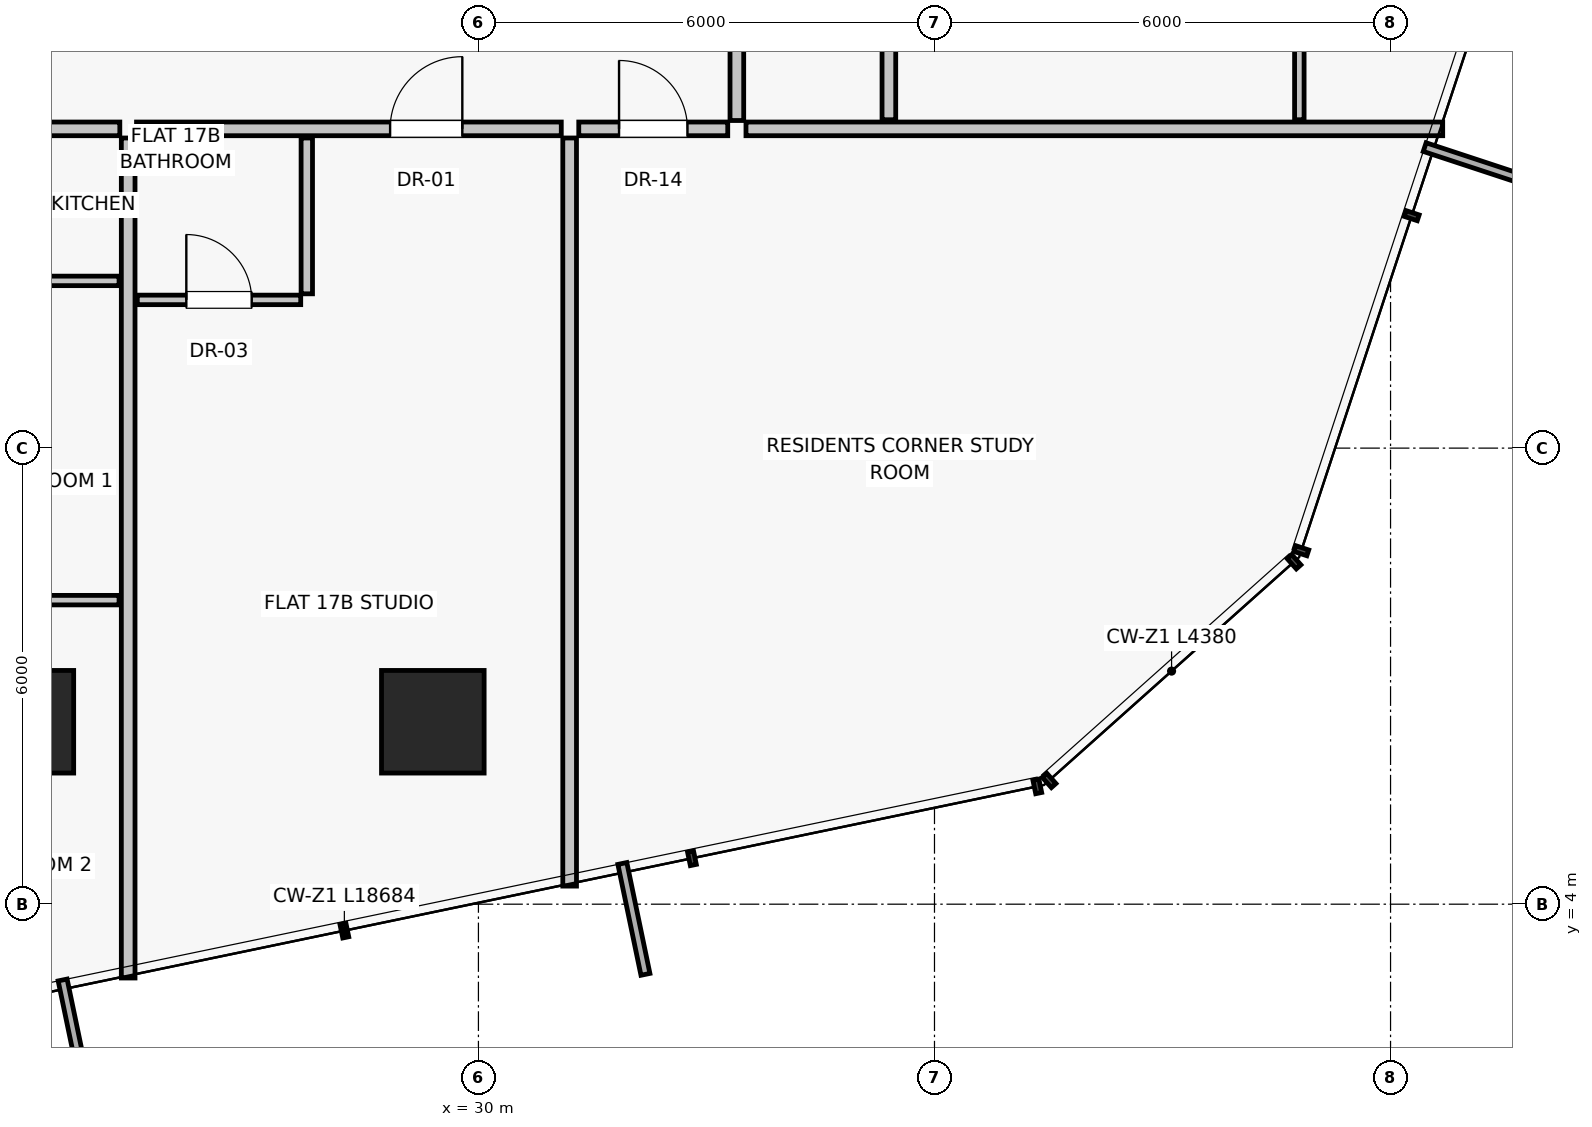
"""IFC4 building model, lengths in metres.
Left out: names, types, materials, properties, quantities, classifications, styles, units other than length and angle.
Written with IfcOpenShell. Run it as: python <this file> out.ifc"""

import sys

from ifc_helpers import new_model, si_unit, direction, frame, frame_2d, origin, origin_2d, place, context, subcontext, project, spatial, rectangle, extrude, source, transform, mapped, element, fill, save


model = new_model("IFC4")
c1 = context("Model", 3, precision=1e-05, world=origin(), true_north=direction((0.0, 1.0)))
c2 = subcontext(c1, "Body", "Model", "MODEL_VIEW")
j1 = project(units=[si_unit("LENGTHUNIT", "METRE"), si_unit("PLANEANGLEUNIT", "RADIAN")], contexts=[c1])
p1 = place(None, origin())
s1 = spatial("IfcSite", under=j1, at=p1, CompositionType="ELEMENT")
p2 = place(p1, origin())
s2 = spatial("IfcBuilding", under=s1, at=p2, CompositionType="ELEMENT")
p3 = place(p2, frame((0.0, 0.0, 64.1)))
s3 = spatial("IfcBuildingStorey", under=s2, at=p3, CompositionType="ELEMENT", Elevation=64.1)
for number, where, z_axis, x_axis in (
    (1, (24.0, 6.4, 0.0), (0.0, 0.0, 1.0), (1.0, 0.0, 0.0)),
    (2, (29.4, 6.4, 0.0), (0.0, 0.0, 1.0), (1.0, 0.0, 0.0)),
):
    element("IfcColumn", number, at=place(p3, frame(where, z_axis=z_axis, x_axis=x_axis)), inside=s3, PredefinedType="COLUMN", context=c2, shape_type="SweptSolid", body=[
        extrude(rectangle(XDim=1.35, YDim=1.35, at=origin_2d()), origin(), (0.0, 0.0, 1.0), 3.25),
    ])
p4 = place(p3, frame((31.2, 14.08, 0.0), z_axis=(0.0, 0.0, 1.0), x_axis=(0.0, -1.0, 0.0)))
e3 = element("IfcWall", 3, at=p4, inside=s3, PredefinedType="PARTITIONING", context=c2, shape_type="SweptSolid", body=[
    extrude(rectangle(XDim=9.842, YDim=0.18, at=frame_2d((4.921, 0.0))), origin(), (0.0, 0.0, 1.0), 3.0),
])
p5 = place(p3, frame((16.91, 14.2, 0.0), z_axis=(0.0, 0.0, 1.0), x_axis=(1.0, 0.0, 0.0)))
e4 = element("IfcWall", 4, at=p5, inside=s3, PredefinedType="PARTITIONING", context=c2, shape_type="SweptSolid", body=[
    extrude(rectangle(XDim=8.372, YDim=0.18, at=frame_2d((4.186, 0.0))), origin(), (0.0, 0.0, 1.0), 3.0),
])
p6 = place(p5, frame((2.903, 0.0, 0.0)))
e5 = element("IfcOpeningElement", 5, at=p6, cuts=e4, PredefinedType="OPENING", context=c2, shape_type="SweptSolid", body=[
    extrude(rectangle(XDim=0.95, YDim=2.02, at=frame_2d((0.475, 1.01))), frame((0.0, 0.1, 0.0), z_axis=(0.0, -1.0, 0.0), x_axis=(1.0, 0.0, 0.0)), (0.0, 0.0, 1.0), 0.2),
])
for number, where, z_axis, x_axis in (
    (6, (21.626, 12.2, 0.0), (0.0, 0.0, 1.0), (1.0, 0.0, 0.0)),
    (7, (21.626, 8.0, 0.0), (0.0, 0.0, 1.0), (1.0, 0.0, 0.0)),
):
    element("IfcWall", number, at=place(p3, frame(where, z_axis=z_axis, x_axis=x_axis)), inside=s3, PredefinedType="PARTITIONING", context=c2, shape_type="SweptSolid", body=[
        extrude(rectangle(XDim=3.646, YDim=0.125, at=frame_2d((1.823, 0.0))), origin(), (0.0, 0.0, 1.0), 3.0),
    ])
p7 = place(p3, frame((25.392, 14.08, 0.0), z_axis=(0.0, 0.0, 1.0), x_axis=(0.0, -1.0, 0.0)))
e8 = element("IfcWall", 8, at=p7, inside=s3, PredefinedType="PARTITIONING", context=c2, shape_type="SweptSolid", body=[
    extrude(rectangle(XDim=11.051, YDim=0.18, at=frame_2d((5.526, 0.0))), origin(), (0.0, 0.0, 1.0), 3.0),
])
p8 = place(p3, frame((25.502, 14.2, 0.0), z_axis=(0.0, 0.0, 1.0), x_axis=(1.0, 0.0, 0.0)))
e9 = element("IfcWall", 9, at=p8, inside=s3, PredefinedType="PARTITIONING", context=c2, shape_type="SweptSolid", body=[
    extrude(rectangle(XDim=5.588, YDim=0.18, at=frame_2d((2.794, 0.0))), origin(), (0.0, 0.0, 1.0), 3.0),
])
p9 = place(p8, frame((3.336, 0.0, 0.0)))
e10 = element("IfcOpeningElement", 10, at=p9, cuts=e9, PredefinedType="OPENING", context=c2, shape_type="SweptSolid", body=[
    extrude(rectangle(XDim=0.95, YDim=2.02, at=frame_2d((0.475, 1.01))), frame((0.0, 0.1, 0.0), z_axis=(0.0, -1.0, 0.0), x_axis=(1.0, 0.0, 0.0)), (0.0, 0.0, 1.0), 0.2),
])
p10 = place(p3, frame((27.742, 14.08, 0.0), z_axis=(0.0, 0.0, 1.0), x_axis=(0.0, -1.0, 0.0)))
e11 = element("IfcWall", 11, at=p10, inside=s3, PredefinedType="PARTITIONING", context=c2, shape_type="SweptSolid", body=[
    extrude(rectangle(XDim=2.05, YDim=0.15, at=frame_2d((1.025, 0.0))), origin(), (0.0, 0.0, 1.0), 3.0),
])
p11 = place(p3, frame((25.512, 11.95, 0.0), z_axis=(0.0, 0.0, 1.0), x_axis=(1.0, 0.0, 0.0)))
e12 = element("IfcWall", 12, at=p11, inside=s3, PredefinedType="PARTITIONING", context=c2, shape_type="SweptSolid", body=[
    extrude(rectangle(XDim=2.15, YDim=0.125, at=frame_2d((1.075, 0.0))), origin(), (0.0, 0.0, 1.0), 2.58),
])
p12 = place(p11, frame((0.645, 0.0, 0.0)))
e13 = element("IfcOpeningElement", 13, at=p12, cuts=e12, PredefinedType="OPENING", context=c2, shape_type="SweptSolid", body=[
    extrude(rectangle(XDim=0.86, YDim=2.01, at=frame_2d((0.43, 1.005))), frame((0.0, 0.073, 0.0), z_axis=(0.0, -1.0, 0.0), x_axis=(1.0, 0.0, 0.0)), (0.0, 0.0, 1.0), 0.145),
])
p13 = place(p3, frame((33.52, 14.2, 0.0), z_axis=(0.0, 0.0, 1.0), x_axis=(1.0, 0.0, 0.0)))
e14 = element("IfcWall", 14, at=p13, inside=s3, PredefinedType="PARTITIONING", context=c2, shape_type="SweptSolid", body=[
    extrude(rectangle(XDim=9.166, YDim=0.18, at=frame_2d((4.583, 0.0))), origin(), (0.0, 0.0, 1.0), 3.0),
])
p14 = place(p3, frame((33.4, 14.31, 0.0), z_axis=(0.0, 0.0, 1.0), x_axis=(0.0, 1.0, 0.0)))
e15 = element("IfcWall", 15, at=p14, inside=s3, PredefinedType="PARTITIONING", context=c2, shape_type="SweptSolid", body=[
    extrude(rectangle(XDim=4.18, YDim=0.18, at=frame_2d((2.09, 0.0))), origin(), (0.0, 0.0, 1.0), 3.0),
])
p15 = place(p14, frame((1.59, 0.0, 0.0)))
e16 = element("IfcOpeningElement", 16, at=p15, cuts=e15, PredefinedType="OPENING", context=c2, shape_type="SweptSolid", body=[
    extrude(rectangle(XDim=1.0, YDim=2.01, at=frame_2d((0.5, 1.005))), frame((0.0, 0.1, 0.0), z_axis=(0.0, -1.0, 0.0), x_axis=(1.0, 0.0, 0.0)), (0.0, 0.0, 1.0), 0.2),
])
p16 = place(p3, frame((40.8, 14.32, 0.0), z_axis=(0.0, 0.0, 1.0), x_axis=(0.0, 1.0, 0.0)))
e17 = element("IfcWall", 17, at=p16, inside=s3, PredefinedType="PARTITIONING", context=c2, shape_type="SweptSolid", body=[
    extrude(rectangle(XDim=4.18, YDim=0.125, at=frame_2d((2.09, 0.0))), origin(), (0.0, 0.0, 1.0), 3.0),
])
p17 = place(p3, frame((35.4, 14.32, 0.0), z_axis=(0.0, 0.0, 1.0), x_axis=(0.0, 1.0, 0.0)))
e18 = element("IfcWall", 18, at=p17, inside=s3, PredefinedType="PARTITIONING", context=c2, shape_type="SweptSolid", body=[
    extrude(rectangle(XDim=4.18, YDim=0.18, at=frame_2d((2.09, 0.0))), origin(), (0.0, 0.0, 1.0), 3.0),
])
p18 = place(p3, frame((31.32, 14.2, 0.0), z_axis=(0.0, 0.0, 1.0), x_axis=(1.0, 0.0, 0.0)))
e19 = element("IfcWall", 19, at=p18, inside=s3, PredefinedType="PARTITIONING", context=c2, shape_type="SweptSolid", body=[
    extrude(rectangle(XDim=1.96, YDim=0.18, at=frame_2d((0.98, 0.0))), origin(), (0.0, 0.0, 1.0), 3.0),
])
p19 = place(p18, frame((0.53, 0.0, 0.0)))
e20 = element("IfcOpeningElement", 20, at=p19, cuts=e19, PredefinedType="OPENING", context=c2, shape_type="SweptSolid", body=[
    extrude(rectangle(XDim=0.9, YDim=2.01, at=frame_2d((0.45, 1.005))), frame((0.0, 0.1, 0.0), z_axis=(0.0, -1.0, 0.0), x_axis=(1.0, 0.0, 0.0)), (0.0, 0.0, 1.0), 0.2),
])
m1 = source(origin(), c2, "Body", "SweptSolid", [
    extrude(rectangle(XDim=0.95, YDim=2.02, at=frame_2d((0.475, 1.01))), frame((0.0, 0.025, 0.0), z_axis=(0.0, -1.0, 0.0), x_axis=(1.0, 0.0, 0.0)), (0.0, 0.0, 1.0), 0.05),
])
p20 = place(p9, origin())
e21 = element("IfcDoor", 21, at=p20, inside=s3, OperationType="SINGLE_SWING_RIGHT", PredefinedType="DOOR", context=c2, shape_type="MappedRepresentation", body=[
    mapped(m1, transform((0.0, 0.0, 0.0), scale=1.0)),
])
fill(e10, e21)
m2 = source(origin(), c2, "Body", "SweptSolid", [
    extrude(rectangle(XDim=0.86, YDim=2.01, at=frame_2d((0.43, 1.005))), frame((0.0, 0.025, 0.0), z_axis=(0.0, -1.0, 0.0), x_axis=(1.0, 0.0, 0.0)), (0.0, 0.0, 1.0), 0.05),
])
p21 = place(p12, origin())
e22 = element("IfcDoor", 22, at=p21, inside=s3, OperationType="SINGLE_SWING_LEFT", PredefinedType="DOOR", context=c2, shape_type="MappedRepresentation", body=[
    mapped(m2, transform((0.0, 0.0, 0.0), scale=1.0)),
])
fill(e13, e22)
m3 = source(origin(), c2, "Body", "SweptSolid", [
    extrude(rectangle(XDim=0.9, YDim=2.01, at=frame_2d((0.45, 1.005))), frame((0.0, 0.025, 0.0), z_axis=(0.0, -1.0, 0.0), x_axis=(1.0, 0.0, 0.0)), (0.0, 0.0, 1.0), 0.05),
])
p22 = place(p19, origin())
e23 = element("IfcDoor", 23, at=p22, inside=s3, OperationType="SINGLE_SWING_LEFT", PredefinedType="DOOR", context=c2, shape_type="MappedRepresentation", body=[
    mapped(m3, transform((0.0, 0.0, 0.0), scale=1.0)),
])
fill(e20, e23)
save(model, sys.argv[1])
